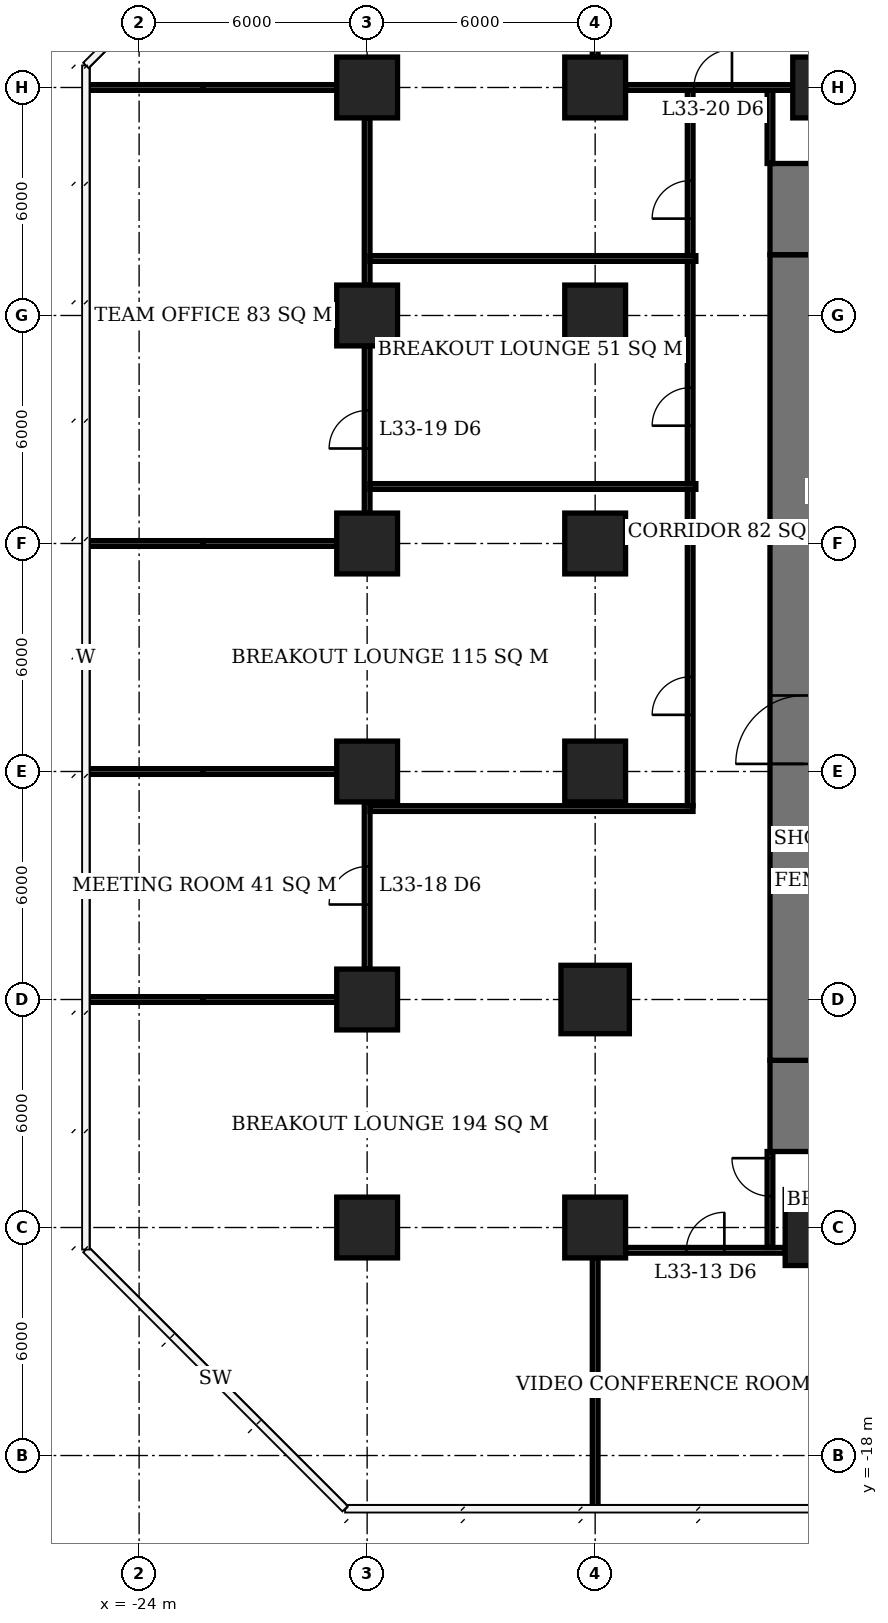
"""IFC4 building model, lengths in metres.
Left out: names, types, materials, properties, quantities, classifications, styles, units other than length and angle.
Written with IfcOpenShell. Run it as: python <this file> out.ifc"""

import sys

from ifc_helpers import new_model, si_unit, direction, frame, frame_2d, origin, origin_2d, place, context, subcontext, project, spatial, rectangle, extrude, element, fill, save


model = new_model("IFC4")
c1 = context("Model", 3, precision=1e-05, world=origin(), true_north=direction((0.0, 1.0)))
c2 = subcontext(c1, "Body", "Model", "MODEL_VIEW")
j1 = project(units=[si_unit("LENGTHUNIT", "METRE"), si_unit("PLANEANGLEUNIT", "RADIAN")], contexts=[c1])
p1 = place(None, origin())
s1 = spatial("IfcSite", under=j1, at=p1, CompositionType="ELEMENT")
p2 = place(p1, origin())
s2 = spatial("IfcBuilding", under=s1, at=p2, CompositionType="ELEMENT")
p3 = place(p2, frame((0.0, 0.0, 136.7)))
s3 = spatial("IfcBuildingStorey", under=s2, at=p3, CompositionType="ELEMENT", Elevation=136.7)
for number, where, z_axis, x_axis in (
    (1, (-18.0, -12.0, 0.0), (0.0, 0.0, 1.0), (1.0, 0.0, 0.0)),
    (2, (-18.0, -6.0, 0.0), (0.0, 0.0, 1.0), (1.0, 0.0, 0.0)),
    (3, (-18.0, 0.0, 0.0), (0.0, 0.0, 1.0), (1.0, 0.0, 0.0)),
    (4, (-18.0, 6.0, 0.0), (0.0, 0.0, 1.0), (1.0, 0.0, 0.0)),
    (5, (-18.0, 12.0, 0.0), (0.0, 0.0, 1.0), (1.0, 0.0, 0.0)),
    (6, (-18.0, 18.0, 0.0), (0.0, 0.0, 1.0), (1.0, 0.0, 0.0)),
    (7, (-12.0, -12.0, 0.0), (0.0, 0.0, 1.0), (1.0, 0.0, 0.0)),
):
    element("IfcColumn", number, at=place(p3, frame(where, z_axis=z_axis, x_axis=x_axis)), inside=s3, PredefinedType="COLUMN", context=c2, shape_type="SweptSolid", body=[
        extrude(rectangle(XDim=1.6, YDim=1.6, at=origin_2d()), origin(), (0.0, 0.0, 1.0), 3.9),
    ])
p4 = place(p3, frame((-12.0, -6.0, 0.0), z_axis=(0.0, 0.0, 1.0), x_axis=(1.0, 0.0, 0.0)))
e8 = element("IfcColumn", 8, at=p4, inside=s3, PredefinedType="COLUMN", context=c2, shape_type="SweptSolid", body=[
    extrude(rectangle(XDim=1.8, YDim=1.8, at=origin_2d()), origin(), (0.0, 0.0, 1.0), 3.9),
])
for number, where, z_axis, x_axis in (
    (9, (-12.0, 0.0, 0.0), (0.0, 0.0, 1.0), (1.0, 0.0, 0.0)),
    (10, (-12.0, 6.0, 0.0), (0.0, 0.0, 1.0), (1.0, 0.0, 0.0)),
    (11, (-12.0, 12.0, 0.0), (0.0, 0.0, 1.0), (1.0, 0.0, 0.0)),
    (12, (-12.0, 18.0, 0.0), (0.0, 0.0, 1.0), (1.0, 0.0, 0.0)),
):
    element("IfcColumn", number, at=place(p3, frame(where, z_axis=z_axis, x_axis=x_axis)), inside=s3, PredefinedType="COLUMN", context=c2, shape_type="SweptSolid", body=[
        extrude(rectangle(XDim=1.6, YDim=1.6, at=origin_2d()), origin(), (0.0, 0.0, 1.0), 3.9),
    ])
p5 = place(p3, frame((-6.0, -12.0, 0.0), z_axis=(0.0, 0.0, 1.0), x_axis=(1.0, 0.0, 0.0)))
e13 = element("IfcColumn", 13, at=p5, inside=s3, PredefinedType="COLUMN", context=c2, shape_type="SweptSolid", body=[
    extrude(rectangle(XDim=2.0, YDim=2.0, at=origin_2d()), origin(), (0.0, 0.0, 1.0), 3.9),
])
p6 = place(p3, frame((-6.0, 18.0, 0.0), z_axis=(0.0, 0.0, 1.0), x_axis=(1.0, 0.0, 0.0)))
e14 = element("IfcColumn", 14, at=p6, inside=s3, PredefinedType="COLUMN", context=c2, shape_type="SweptSolid", body=[
    extrude(rectangle(XDim=1.6, YDim=1.6, at=origin_2d()), origin(), (0.0, 0.0, 1.0), 3.9),
])
p7 = place(p3, frame((-6.5, -7.6, 0.0), z_axis=(0.0, 0.0, 1.0), x_axis=(0.0, 1.0, 0.0)))
e15 = element("IfcWall", 15, at=p7, inside=s3, PredefinedType="SHEAR", context=c2, shape_type="SweptSolid", body=[
    extrude(rectangle(XDim=21.2, YDim=1.8, at=frame_2d((10.6, 0.0))), origin(), (0.0, 0.0, 1.0), 3.9),
])
p8 = place(p7, frame((7.8, 0.0, 0.0)))
e16 = element("IfcOpeningElement", 16, at=p8, cuts=e15, PredefinedType="OPENING", context=c2, shape_type="SweptSolid", body=[
    extrude(rectangle(XDim=1.8, YDim=2.4, at=frame_2d((0.9, 1.2))), frame((0.0, 0.91, 0.0), z_axis=(0.0, -1.0, 0.0), x_axis=(1.0, 0.0, 0.0)), (0.0, 0.0, 1.0), 1.82),
])
for number, where, z_axis, x_axis in (
    (17, (-6.5, -10.0, 0.0), (0.0, 0.0, 1.0), (0.0, 1.0, 0.0)),
    (18, (-6.5, 13.6, 0.0), (0.0, 0.0, 1.0), (0.0, 1.0, 0.0)),
):
    element("IfcWall", number, at=place(p3, frame(where, z_axis=z_axis, x_axis=x_axis)), inside=s3, PredefinedType="SHEAR", context=c2, shape_type="SweptSolid", body=[
        extrude(rectangle(XDim=2.4, YDim=1.8, at=frame_2d((1.2, 0.0))), origin(), (0.0, 0.0, 1.0), 3.9),
    ])
p9 = place(p3, frame((-11.2, -12.6, 0.0), z_axis=(0.0, 0.0, 1.0), x_axis=(1.0, 0.0, 0.0)))
e19 = element("IfcWall", 19, at=p9, inside=s3, PredefinedType="PARTITIONING", context=c2, shape_type="SweptSolid", body=[
    extrude(rectangle(XDim=4.2, YDim=0.15, at=frame_2d((2.1, 0.0))), origin(), (0.0, 0.0, 1.0), 3.65),
])
p10 = place(p9, frame((1.6, 0.0, 0.0)))
e20 = element("IfcOpeningElement", 20, at=p10, cuts=e19, PredefinedType="OPENING", context=c2, shape_type="SweptSolid", body=[
    extrude(rectangle(XDim=1.0, YDim=2.1, at=frame_2d((0.5, 1.05))), frame((0.0, 0.085, 0.0), z_axis=(0.0, -1.0, 0.0), x_axis=(1.0, 0.0, 0.0)), (0.0, 0.0, 1.0), 0.17),
])
p11 = place(p3, frame((-25.4, -6.0, 0.0), z_axis=(0.0, 0.0, 1.0), x_axis=(1.0, 0.0, 0.0)))
e21 = element("IfcWall", 21, at=p11, inside=s3, PredefinedType="PARTITIONING", context=c2, shape_type="SweptSolid", body=[
    extrude(rectangle(XDim=3.09, YDim=0.15, at=frame_2d((1.545, 0.0))), origin(), (0.0, 0.0, 1.0), 3.65),
])
p12 = place(p3, frame((-22.31, -6.0, 0.0), z_axis=(0.0, 0.0, 1.0), x_axis=(1.0, 0.0, 0.0)))
e22 = element("IfcWall", 22, at=p12, inside=s3, PredefinedType="PARTITIONING", context=c2, shape_type="SweptSolid", body=[
    extrude(rectangle(XDim=3.51, YDim=0.15, at=frame_2d((1.755, 0.0))), origin(), (0.0, 0.0, 1.0), 2.65),
])
p13 = place(p3, frame((-25.35, 0.0, 0.0), z_axis=(0.0, 0.0, 1.0), x_axis=(1.0, 0.0, 0.0)))
e23 = element("IfcWall", 23, at=p13, inside=s3, PredefinedType="PARTITIONING", context=c2, shape_type="SweptSolid", body=[
    extrude(rectangle(XDim=3.04, YDim=0.15, at=frame_2d((1.52, 0.0))), origin(), (0.0, 0.0, 1.0), 3.65),
])
p14 = place(p3, frame((-22.31, 0.0, 0.0), z_axis=(0.0, 0.0, 1.0), x_axis=(1.0, 0.0, 0.0)))
e24 = element("IfcWall", 24, at=p14, inside=s3, PredefinedType="PARTITIONING", context=c2, shape_type="SweptSolid", body=[
    extrude(rectangle(XDim=3.51, YDim=0.15, at=frame_2d((1.755, 0.0))), origin(), (0.0, 0.0, 1.0), 2.65),
])
p15 = place(p3, frame((-25.35, 6.0, 0.0), z_axis=(0.0, 0.0, 1.0), x_axis=(1.0, 0.0, 0.0)))
e25 = element("IfcWall", 25, at=p15, inside=s3, PredefinedType="PARTITIONING", context=c2, shape_type="SweptSolid", body=[
    extrude(rectangle(XDim=3.04, YDim=0.15, at=frame_2d((1.52, 0.0))), origin(), (0.0, 0.0, 1.0), 3.65),
])
p16 = place(p3, frame((-22.31, 6.0, 0.0), z_axis=(0.0, 0.0, 1.0), x_axis=(1.0, 0.0, 0.0)))
e26 = element("IfcWall", 26, at=p16, inside=s3, PredefinedType="PARTITIONING", context=c2, shape_type="SweptSolid", body=[
    extrude(rectangle(XDim=3.51, YDim=0.15, at=frame_2d((1.755, 0.0))), origin(), (0.0, 0.0, 1.0), 2.65),
])
p17 = place(p3, frame((-25.4, 18.0, 0.0), z_axis=(0.0, 0.0, 1.0), x_axis=(1.0, 0.0, 0.0)))
e27 = element("IfcWall", 27, at=p17, inside=s3, PredefinedType="PARTITIONING", context=c2, shape_type="SweptSolid", body=[
    extrude(rectangle(XDim=3.09, YDim=0.15, at=frame_2d((1.545, 0.0))), origin(), (0.0, 0.0, 1.0), 3.65),
])
p18 = place(p3, frame((-22.31, 18.0, 0.0), z_axis=(0.0, 0.0, 1.0), x_axis=(1.0, 0.0, 0.0)))
e28 = element("IfcWall", 28, at=p18, inside=s3, PredefinedType="PARTITIONING", context=c2, shape_type="SweptSolid", body=[
    extrude(rectangle(XDim=3.51, YDim=0.15, at=frame_2d((1.755, 0.0))), origin(), (0.0, 0.0, 1.0), 2.65),
])
p19 = place(p3, frame((-11.2, 18.0, 0.0), z_axis=(0.0, 0.0, 1.0), x_axis=(1.0, 0.0, 0.0)))
e29 = element("IfcWall", 29, at=p19, inside=s3, PredefinedType="PARTITIONING", context=c2, shape_type="SweptSolid", body=[
    extrude(rectangle(XDim=4.4, YDim=0.15, at=frame_2d((2.2, 0.0))), origin(), (0.0, 0.0, 1.0), 3.65),
])
p20 = place(p19, frame((1.8, 0.0, 0.0)))
e30 = element("IfcOpeningElement", 30, at=p20, cuts=e29, PredefinedType="OPENING", context=c2, shape_type="SweptSolid", body=[
    extrude(rectangle(XDim=1.0, YDim=2.1, at=frame_2d((0.5, 1.05))), frame((0.0, 0.085, 0.0), z_axis=(0.0, -1.0, 0.0), x_axis=(1.0, 0.0, 0.0)), (0.0, 0.0, 1.0), 0.17),
])
p21 = place(p3, frame((-18.0, -5.2, 0.0), z_axis=(0.0, 0.0, 1.0), x_axis=(0.0, 1.0, 0.0)))
e31 = element("IfcWall", 31, at=p21, inside=s3, PredefinedType="PARTITIONING", context=c2, shape_type="SweptSolid", body=[
    extrude(rectangle(XDim=4.4, YDim=0.15, at=frame_2d((2.2, 0.0))), origin(), (0.0, 0.0, 1.0), 3.65),
])
p22 = place(p21, frame((1.7, 0.0, 0.0)))
e32 = element("IfcOpeningElement", 32, at=p22, cuts=e31, PredefinedType="OPENING", context=c2, shape_type="SweptSolid", body=[
    extrude(rectangle(XDim=1.0, YDim=2.1, at=frame_2d((0.5, 1.05))), frame((0.0, 0.085, 0.0), z_axis=(0.0, -1.0, 0.0), x_axis=(1.0, 0.0, 0.0)), (0.0, 0.0, 1.0), 0.17),
])
p23 = place(p3, frame((-18.0, 6.8, 0.0), z_axis=(0.0, 0.0, 1.0), x_axis=(0.0, 1.0, 0.0)))
e33 = element("IfcWall", 33, at=p23, inside=s3, PredefinedType="PARTITIONING", context=c2, shape_type="SweptSolid", body=[
    extrude(rectangle(XDim=4.4, YDim=0.15, at=frame_2d((2.2, 0.0))), origin(), (0.0, 0.0, 1.0), 3.65),
])
p24 = place(p23, frame((1.7, 0.0, 0.0)))
e34 = element("IfcOpeningElement", 34, at=p24, cuts=e33, PredefinedType="OPENING", context=c2, shape_type="SweptSolid", body=[
    extrude(rectangle(XDim=1.0, YDim=2.1, at=frame_2d((0.5, 1.05))), frame((0.0, 0.085, 0.0), z_axis=(0.0, -1.0, 0.0), x_axis=(1.0, 0.0, 0.0)), (0.0, 0.0, 1.0), 0.17),
])
p25 = place(p3, frame((-18.0, 12.8, 0.0), z_axis=(0.0, 0.0, 1.0), x_axis=(0.0, 1.0, 0.0)))
e35 = element("IfcWall", 35, at=p25, inside=s3, PredefinedType="PARTITIONING", context=c2, shape_type="SweptSolid", body=[
    extrude(rectangle(XDim=4.4, YDim=0.15, at=frame_2d((2.2, 0.0))), origin(), (0.0, 0.0, 1.0), 3.65),
])
p26 = place(p3, frame((-12.0, -19.4, 0.0), z_axis=(0.0, 0.0, 1.0), x_axis=(0.0, 1.0, 0.0)))
e36 = element("IfcWall", 36, at=p26, inside=s3, PredefinedType="PARTITIONING", context=c2, shape_type="SweptSolid", body=[
    extrude(rectangle(XDim=3.09, YDim=0.15, at=frame_2d((1.545, 0.0))), origin(), (0.0, 0.0, 1.0), 3.65),
])
p27 = place(p3, frame((-12.0, -16.31, 0.0), z_axis=(0.0, 0.0, 1.0), x_axis=(0.0, 1.0, 0.0)))
e37 = element("IfcWall", 37, at=p27, inside=s3, PredefinedType="PARTITIONING", context=c2, shape_type="SweptSolid", body=[
    extrude(rectangle(XDim=3.51, YDim=0.15, at=frame_2d((1.755, 0.0))), origin(), (0.0, 0.0, 1.0), 2.65),
])
p28 = place(p3, frame((-12.0, 18.8, 0.0), z_axis=(0.0, 0.0, 1.0), x_axis=(0.0, 1.0, 0.0)))
e38 = element("IfcWall", 38, at=p28, inside=s3, PredefinedType="PARTITIONING", context=c2, shape_type="SweptSolid", body=[
    extrude(rectangle(XDim=4.55, YDim=0.15, at=frame_2d((2.275, 0.0))), origin(), (0.0, 0.0, 1.0), 3.65),
])
p29 = place(p3, frame((-17.925, -0.975, 0.0), z_axis=(0.0, 0.0, 1.0), x_axis=(1.0, 0.0, 0.0)))
e39 = element("IfcWall", 39, at=p29, inside=s3, PredefinedType="PARTITIONING", context=c2, shape_type="SweptSolid", body=[
    extrude(rectangle(XDim=8.5, YDim=0.15, at=frame_2d((4.25, 0.0))), origin(), (0.0, 0.0, 1.0), 3.65),
])
for number, where, z_axis, x_axis in (
    (40, (-17.925, 7.5, 0.0), (0.0, 0.0, 1.0), (1.0, 0.0, 0.0)),
    (41, (-17.925, 13.5, 0.0), (0.0, 0.0, 1.0), (1.0, 0.0, 0.0)),
):
    element("IfcWall", number, at=place(p3, frame(where, z_axis=z_axis, x_axis=x_axis)), inside=s3, PredefinedType="PARTITIONING", context=c2, shape_type="SweptSolid", body=[
        extrude(rectangle(XDim=8.575, YDim=0.15, at=frame_2d((4.288, 0.0))), origin(), (0.0, 0.0, 1.0), 3.65),
    ])
p30 = place(p3, frame((-9.5, -0.9, 0.0), z_axis=(0.0, 0.0, 1.0), x_axis=(0.0, 1.0, 0.0)))
e42 = element("IfcWall", 42, at=p30, inside=s3, PredefinedType="PARTITIONING", context=c2, shape_type="SweptSolid", body=[
    extrude(rectangle(XDim=8.325, YDim=0.15, at=frame_2d((4.163, 0.0))), origin(), (0.0, 0.0, 1.0), 3.65),
])
p31 = place(p30, frame((2.391, 0.0, 0.0)))
e43 = element("IfcOpeningElement", 43, at=p31, cuts=e42, PredefinedType="OPENING", context=c2, shape_type="SweptSolid", body=[
    extrude(rectangle(XDim=1.0, YDim=2.1, at=frame_2d((0.5, 1.05))), frame((0.0, 0.085, 0.0), z_axis=(0.0, -1.0, 0.0), x_axis=(1.0, 0.0, 0.0)), (0.0, 0.0, 1.0), 0.17),
])
p32 = place(p3, frame((-9.5, 7.575, 0.0), z_axis=(0.0, 0.0, 1.0), x_axis=(0.0, 1.0, 0.0)))
e44 = element("IfcWall", 44, at=p32, inside=s3, PredefinedType="PARTITIONING", context=c2, shape_type="SweptSolid", body=[
    extrude(rectangle(XDim=5.85, YDim=0.15, at=frame_2d((2.925, 0.0))), origin(), (0.0, 0.0, 1.0), 3.65),
])
p33 = place(p32, frame((1.525, 0.0, 0.0)))
e45 = element("IfcOpeningElement", 45, at=p33, cuts=e44, PredefinedType="OPENING", context=c2, shape_type="SweptSolid", body=[
    extrude(rectangle(XDim=1.0, YDim=2.1, at=frame_2d((0.5, 1.05))), frame((0.0, 0.085, 0.0), z_axis=(0.0, -1.0, 0.0), x_axis=(1.0, 0.0, 0.0)), (0.0, 0.0, 1.0), 0.17),
])
p34 = place(p3, frame((-9.5, 13.575, 0.0), z_axis=(0.0, 0.0, 1.0), x_axis=(0.0, 1.0, 0.0)))
e46 = element("IfcWall", 46, at=p34, inside=s3, PredefinedType="PARTITIONING", context=c2, shape_type="SweptSolid", body=[
    extrude(rectangle(XDim=4.35, YDim=0.15, at=frame_2d((2.175, 0.0))), origin(), (0.0, 0.0, 1.0), 3.65),
])
p35 = place(p34, frame((0.974, 0.0, 0.0)))
e47 = element("IfcOpeningElement", 47, at=p35, cuts=e46, PredefinedType="OPENING", context=c2, shape_type="SweptSolid", body=[
    extrude(rectangle(XDim=1.0, YDim=2.1, at=frame_2d((0.5, 1.05))), frame((0.0, 0.085, 0.0), z_axis=(0.0, -1.0, 0.0), x_axis=(1.0, 0.0, 0.0)), (0.0, 0.0, 1.0), 0.17),
])
p36 = place(p3, frame((-7.4, -12.525, 0.0), z_axis=(0.0, 0.0, 1.0), x_axis=(0.0, 1.0, 0.0)))
e48 = element("IfcWall", 48, at=p36, inside=s3, PredefinedType="PARTITIONING", context=c2, shape_type="SweptSolid", body=[
    extrude(rectangle(XDim=2.525, YDim=0.15, at=frame_2d((1.262, 0.0))), origin(), (0.0, 0.0, 1.0), 3.65),
])
p37 = place(p36, frame((1.35, 0.0, 0.0)))
e49 = element("IfcOpeningElement", 49, at=p37, cuts=e48, PredefinedType="OPENING", context=c2, shape_type="SweptSolid", body=[
    extrude(rectangle(XDim=1.0, YDim=2.1, at=frame_2d((0.5, 1.05))), frame((0.0, 0.085, 0.0), z_axis=(0.0, -1.0, 0.0), x_axis=(1.0, 0.0, 0.0)), (0.0, 0.0, 1.0), 0.17),
])
p38 = place(p3, frame((-7.4, 16.0, 0.0), z_axis=(0.0, 0.0, 1.0), x_axis=(0.0, 1.0, 0.0)))
e50 = element("IfcWall", 50, at=p38, inside=s3, PredefinedType="PARTITIONING", context=c2, shape_type="SweptSolid", body=[
    extrude(rectangle(XDim=1.925, YDim=0.15, at=frame_2d((0.962, 0.0))), origin(), (0.0, 0.0, 1.0), 3.65),
])
p39 = place(p8, origin())
e51 = element("IfcDoor", 51, at=p39, inside=s3, OperationType="DOUBLE_DOOR_SINGLE_SWING", PredefinedType="DOOR", context=c2, shape_type="SweptSolid", body=[
    extrude(rectangle(XDim=1.8, YDim=2.4, at=frame_2d((0.9, 1.2))), frame((0.0, 0.025, 0.0), z_axis=(0.0, -1.0, 0.0), x_axis=(1.0, 0.0, 0.0)), (0.0, 0.0, 1.0), 0.05),
])
fill(e16, e51)
p40 = place(p10, origin())
e52 = element("IfcDoor", 52, at=p40, inside=s3, OperationType="SINGLE_SWING_RIGHT", PredefinedType="DOOR", context=c2, shape_type="SweptSolid", body=[
    extrude(rectangle(XDim=1.0, YDim=2.1, at=frame_2d((0.5, 1.05))), frame((0.0, 0.025, 0.0), z_axis=(0.0, -1.0, 0.0), x_axis=(1.0, 0.0, 0.0)), (0.0, 0.0, 1.0), 0.05),
])
fill(e20, e52)
p41 = place(p22, origin())
e53 = element("IfcDoor", 53, at=p41, inside=s3, OperationType="SINGLE_SWING_LEFT", PredefinedType="DOOR", context=c2, shape_type="SweptSolid", body=[
    extrude(rectangle(XDim=1.0, YDim=2.1, at=frame_2d((0.5, 1.05))), frame((0.0, 0.025, 0.0), z_axis=(0.0, -1.0, 0.0), x_axis=(1.0, 0.0, 0.0)), (0.0, 0.0, 1.0), 0.05),
])
fill(e32, e53)
p42 = place(p24, origin())
e54 = element("IfcDoor", 54, at=p42, inside=s3, OperationType="SINGLE_SWING_LEFT", PredefinedType="DOOR", context=c2, shape_type="SweptSolid", body=[
    extrude(rectangle(XDim=1.0, YDim=2.1, at=frame_2d((0.5, 1.05))), frame((0.0, 0.025, 0.0), z_axis=(0.0, -1.0, 0.0), x_axis=(1.0, 0.0, 0.0)), (0.0, 0.0, 1.0), 0.05),
])
fill(e34, e54)
p43 = place(p20, origin())
e55 = element("IfcDoor", 55, at=p43, inside=s3, OperationType="SINGLE_SWING_RIGHT", PredefinedType="DOOR", context=c2, shape_type="SweptSolid", body=[
    extrude(rectangle(XDim=1.0, YDim=2.1, at=frame_2d((0.5, 1.05))), frame((0.0, 0.025, 0.0), z_axis=(0.0, -1.0, 0.0), x_axis=(1.0, 0.0, 0.0)), (0.0, 0.0, 1.0), 0.05),
])
fill(e30, e55)
p44 = place(p31, origin())
e56 = element("IfcDoor", 56, at=p44, inside=s3, OperationType="SINGLE_SWING_LEFT", PredefinedType="DOOR", context=c2, shape_type="SweptSolid", body=[
    extrude(rectangle(XDim=1.0, YDim=2.1, at=frame_2d((0.5, 1.05))), frame((0.0, 0.025, 0.0), z_axis=(0.0, -1.0, 0.0), x_axis=(1.0, 0.0, 0.0)), (0.0, 0.0, 1.0), 0.05),
])
fill(e43, e56)
p45 = place(p33, origin())
e57 = element("IfcDoor", 57, at=p45, inside=s3, OperationType="SINGLE_SWING_LEFT", PredefinedType="DOOR", context=c2, shape_type="SweptSolid", body=[
    extrude(rectangle(XDim=1.0, YDim=2.1, at=frame_2d((0.5, 1.05))), frame((0.0, 0.025, 0.0), z_axis=(0.0, -1.0, 0.0), x_axis=(1.0, 0.0, 0.0)), (0.0, 0.0, 1.0), 0.05),
])
fill(e45, e57)
p46 = place(p35, origin())
e58 = element("IfcDoor", 58, at=p46, inside=s3, OperationType="SINGLE_SWING_LEFT", PredefinedType="DOOR", context=c2, shape_type="SweptSolid", body=[
    extrude(rectangle(XDim=1.0, YDim=2.1, at=frame_2d((0.5, 1.05))), frame((0.0, 0.025, 0.0), z_axis=(0.0, -1.0, 0.0), x_axis=(1.0, 0.0, 0.0)), (0.0, 0.0, 1.0), 0.05),
])
fill(e47, e58)
p47 = place(p37, origin())
e59 = element("IfcDoor", 59, at=p47, inside=s3, OperationType="SINGLE_SWING_RIGHT", PredefinedType="DOOR", context=c2, shape_type="SweptSolid", body=[
    extrude(rectangle(XDim=1.0, YDim=2.1, at=frame_2d((0.5, 1.05))), frame((0.0, 0.025, 0.0), z_axis=(0.0, -1.0, 0.0), x_axis=(1.0, 0.0, 0.0)), (0.0, 0.0, 1.0), 0.05),
])
fill(e49, e59)
save(model, sys.argv[1])
